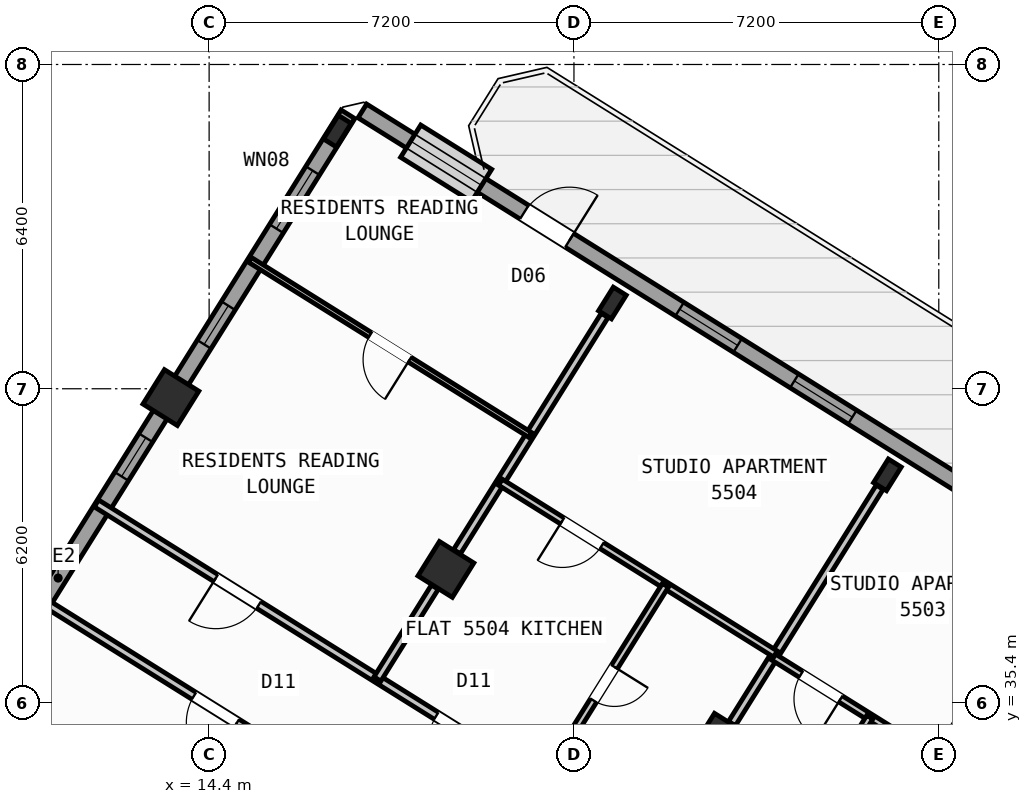
"""IFC4 building model, lengths in metres.
Left out: names, types, materials, properties, quantities, classifications, styles, units other than length and angle.
Written with IfcOpenShell. Run it as: python <this file> out.ifc"""

import sys

from ifc_helpers import new_model, si_unit, direction, frame, frame_2d, origin, origin_2d, place, context, subcontext, project, spatial, rectangle, hollow_rectangle, i_section, extrude, source, transform, mapped, element, fill, save


model = new_model("IFC4")
c1 = context("Model", 3, precision=1e-05, world=origin(), true_north=direction((0.0, 1.0)))
c2 = subcontext(c1, "Body", "Model", "MODEL_VIEW")
j1 = project(units=[si_unit("LENGTHUNIT", "METRE"), si_unit("PLANEANGLEUNIT", "RADIAN")], contexts=[c1])
p1 = place(None, origin())
s1 = spatial("IfcSite", under=j1, at=p1, CompositionType="ELEMENT")
p2 = place(p1, origin())
s2 = spatial("IfcBuilding", under=s1, at=p2, CompositionType="ELEMENT")
p3 = place(p2, frame((0.0, 0.0, 218.4)))
s3 = spatial("IfcBuildingStorey", under=s2, at=p3, CompositionType="ELEMENT", Elevation=218.4)
m1 = source(origin(), c2, "Body", "SweptSolid", [
    extrude(i_section(OverallWidth=0.3, OverallDepth=0.55, WebThickness=0.015, FlangeThickness=0.029, at=origin_2d()), origin(), (0.0, 0.0, 1.0), 3.6),
])
p4 = place(p3, frame((27.786, 39.901, 0.0), z_axis=(0.0, 0.0, 1.0), x_axis=(-0.848048096156, 0.529919264233, 0.0)))
e1 = element("IfcColumn", 1, at=p4, inside=s3, PredefinedType="COLUMN", context=c2, shape_type="MappedRepresentation", body=[
    mapped(m1, transform((0.0, 0.0, 0.0), scale=1.0)),
])
m2 = source(origin(), c2, "Body", "SweptSolid", [
    extrude(hollow_rectangle(XDim=0.8, YDim=0.8, WallThickness=0.032, at=origin_2d()), origin(), (0.0, 0.0, 1.0), 3.6),
])
p5 = place(p3, frame((24.5, 34.643, 0.0), z_axis=(0.0, 0.0, 1.0), x_axis=(-0.848048096156, 0.529919264233, 0.0)))
e2 = element("IfcColumn", 2, at=p5, inside=s3, PredefinedType="COLUMN", context=c2, shape_type="MappedRepresentation", body=[
    mapped(m2, transform((0.0, 0.0, 0.0), scale=1.0)),
])
p6 = place(p3, frame((22.358, 43.292, 0.0), z_axis=(0.0, 0.0, 1.0), x_axis=(-0.848048096156, 0.529919264233, 0.0)))
e3 = element("IfcColumn", 3, at=p6, inside=s3, PredefinedType="COLUMN", context=c2, shape_type="MappedRepresentation", body=[
    mapped(m1, transform((0.0, 0.0, 0.0), scale=1.0)),
])
p7 = place(p3, frame((19.073, 38.034, 0.0), z_axis=(0.0, 0.0, 1.0), x_axis=(-0.848048096156, 0.529919264233, 0.0)))
e4 = element("IfcColumn", 4, at=p7, inside=s3, PredefinedType="COLUMN", context=c2, shape_type="MappedRepresentation", body=[
    mapped(m2, transform((0.0, 0.0, 0.0), scale=1.0)),
])
p8 = place(p3, frame((16.931, 46.684, 0.0), z_axis=(0.0, 0.0, 1.0), x_axis=(-0.848048096156, 0.529919264233, 0.0)))
e5 = element("IfcColumn", 5, at=p8, inside=s3, PredefinedType="COLUMN", context=c2, shape_type="MappedRepresentation", body=[
    mapped(m1, transform((0.0, 0.0, 0.0), scale=1.0)),
])
p9 = place(p3, frame((13.646, 41.426, 0.0), z_axis=(0.0, 0.0, 1.0), x_axis=(-0.848048096156, 0.529919264233, 0.0)))
e6 = element("IfcColumn", 6, at=p9, inside=s3, PredefinedType="COLUMN", context=c2, shape_type="MappedRepresentation", body=[
    mapped(m2, transform((0.0, 0.0, 0.0), scale=1.0)),
])
p10 = place(p3, frame((5.7, 28.71, 0.0), z_axis=(0.0, 0.0, 1.0), x_axis=(0.529923711467, 0.8480453172, 0.0)))
e7 = element("IfcWall", 7, at=p10, inside=s3, PredefinedType="STANDARD", context=c2, shape_type="SweptSolid", body=[
    extrude(rectangle(XDim=21.587, YDim=0.32, at=frame_2d((10.794, 0.0))), origin(), (0.0, 0.0, 1.0), 2.825),
])
p11 = place(p10, frame((2.319, 0.0, 0.9)))
e8 = element("IfcOpeningElement", 8, at=p11, cuts=e7, PredefinedType="OPENING", context=c2, shape_type="SweptSolid", body=[
    extrude(rectangle(XDim=1.65, YDim=1.45, at=frame_2d((0.825, 0.725))), frame((0.0, 0.17, 0.0), z_axis=(0.0, -1.0, 0.0), x_axis=(1.0, 0.0, 0.0)), (0.0, 0.0, 1.0), 0.34),
])
p12 = place(p10, frame((8.629, 0.0, 1.0)))
e9 = element("IfcOpeningElement", 9, at=p12, cuts=e7, PredefinedType="OPENING", context=c2, shape_type="SweptSolid", body=[
    extrude(rectangle(XDim=0.9, YDim=1.25, at=frame_2d((0.45, 0.625))), frame((0.0, 0.17, 0.0), z_axis=(0.0, -1.0, 0.0), x_axis=(1.0, 0.0, 0.0)), (0.0, 0.0, 1.0), 0.34),
])
p13 = place(p10, frame((13.159, 0.0, 1.0)))
e10 = element("IfcOpeningElement", 10, at=p13, cuts=e7, PredefinedType="OPENING", context=c2, shape_type="SweptSolid", body=[
    extrude(rectangle(XDim=0.9, YDim=1.25, at=frame_2d((0.45, 0.625))), frame((0.0, 0.17, 0.0), z_axis=(0.0, -1.0, 0.0), x_axis=(1.0, 0.0, 0.0)), (0.0, 0.0, 1.0), 0.34),
])
p14 = place(p10, frame((16.232, 0.0, 1.0)))
e11 = element("IfcOpeningElement", 11, at=p14, cuts=e7, PredefinedType="OPENING", context=c2, shape_type="SweptSolid", body=[
    extrude(rectangle(XDim=0.9, YDim=1.25, at=frame_2d((0.45, 0.625))), frame((0.0, 0.17, 0.0), z_axis=(0.0, -1.0, 0.0), x_axis=(1.0, 0.0, 0.0)), (0.0, 0.0, 1.0), 0.34),
])
p15 = place(p10, frame((18.925, 0.0, 0.9)))
e12 = element("IfcOpeningElement", 12, at=p15, cuts=e7, PredefinedType="OPENING", context=c2, shape_type="SweptSolid", body=[
    extrude(rectangle(XDim=1.35, YDim=1.45, at=frame_2d((0.675, 0.725))), frame((0.0, 0.17, 0.0), z_axis=(0.0, -1.0, 0.0), x_axis=(1.0, 0.0, 0.0)), (0.0, 0.0, 1.0), 0.34),
])
p16 = place(p3, frame((17.424, 47.083, 0.0), z_axis=(0.0, 0.0, 1.0), x_axis=(0.848049927979, -0.529916332693, 0.0)))
e13 = element("IfcWall", 13, at=p16, inside=s3, PredefinedType="STANDARD", context=c2, shape_type="SweptSolid", body=[
    extrude(rectangle(XDim=29.223, YDim=0.32, at=frame_2d((14.612, 0.0))), origin(), (0.0, 0.0, 1.0), 3.35),
])
p17 = place(p16, frame((3.77, 0.0, 0.0)))
e14 = element("IfcOpeningElement", 14, at=p17, cuts=e13, PredefinedType="OPENING", context=c2, shape_type="SweptSolid", body=[
    extrude(rectangle(XDim=1.05, YDim=2.15, at=frame_2d((0.525, 1.075))), frame((0.0, 0.17, 0.0), z_axis=(0.0, -1.0, 0.0), x_axis=(1.0, 0.0, 0.0)), (0.0, 0.0, 1.0), 0.34),
])
p18 = place(p16, frame((1.125, 0.0, 0.9)))
e15 = element("IfcOpeningElement", 15, at=p18, cuts=e13, PredefinedType="OPENING", context=c2, shape_type="SweptSolid", body=[
    extrude(rectangle(XDim=1.65, YDim=1.45, at=frame_2d((0.825, 0.725))), frame((0.0, 0.17, 0.0), z_axis=(0.0, -1.0, 0.0), x_axis=(1.0, 0.0, 0.0)), (0.0, 0.0, 1.0), 0.34),
])
p19 = place(p16, frame((7.384, 0.0, 0.9)))
e16 = element("IfcOpeningElement", 16, at=p19, cuts=e13, PredefinedType="OPENING", context=c2, shape_type="SweptSolid", body=[
    extrude(rectangle(XDim=1.35, YDim=1.45, at=frame_2d((0.675, 0.725))), frame((0.0, 0.17, 0.0), z_axis=(0.0, -1.0, 0.0), x_axis=(1.0, 0.0, 0.0)), (0.0, 0.0, 1.0), 0.34),
])
p20 = place(p16, frame((10.054, 0.0, 0.9)))
e17 = element("IfcOpeningElement", 17, at=p20, cuts=e13, PredefinedType="OPENING", context=c2, shape_type="SweptSolid", body=[
    extrude(rectangle(XDim=1.35, YDim=1.45, at=frame_2d((0.675, 0.725))), frame((0.0, 0.17, 0.0), z_axis=(0.0, -1.0, 0.0), x_axis=(1.0, 0.0, 0.0)), (0.0, 0.0, 1.0), 0.34),
])
p21 = place(p16, frame((14.039, 0.0, 1.0)))
e18 = element("IfcOpeningElement", 18, at=p21, cuts=e13, PredefinedType="OPENING", context=c2, shape_type="SweptSolid", body=[
    extrude(rectangle(XDim=0.9, YDim=1.25, at=frame_2d((0.45, 0.625))), frame((0.0, 0.17, 0.0), z_axis=(0.0, -1.0, 0.0), x_axis=(1.0, 0.0, 0.0)), (0.0, 0.0, 1.0), 0.34),
])
p22 = place(p16, frame((17.254, 0.0, 1.0)))
e19 = element("IfcOpeningElement", 19, at=p22, cuts=e13, PredefinedType="OPENING", context=c2, shape_type="SweptSolid", body=[
    extrude(rectangle(XDim=0.9, YDim=1.25, at=frame_2d((0.45, 0.625))), frame((0.0, 0.17, 0.0), z_axis=(0.0, -1.0, 0.0), x_axis=(1.0, 0.0, 0.0)), (0.0, 0.0, 1.0), 0.34),
])
p23 = place(p16, frame((20.161, 0.0, 0.9)))
e20 = element("IfcOpeningElement", 20, at=p23, cuts=e13, PredefinedType="OPENING", context=c2, shape_type="SweptSolid", body=[
    extrude(rectangle(XDim=1.35, YDim=1.45, at=frame_2d((0.675, 0.725))), frame((0.0, 0.17, 0.0), z_axis=(0.0, -1.0, 0.0), x_axis=(1.0, 0.0, 0.0)), (0.0, 0.0, 1.0), 0.34),
])
p24 = place(p16, frame((22.846, 0.0, 0.9)))
e21 = element("IfcOpeningElement", 21, at=p24, cuts=e13, PredefinedType="OPENING", context=c2, shape_type="SweptSolid", body=[
    extrude(rectangle(XDim=1.35, YDim=1.45, at=frame_2d((0.675, 0.725))), frame((0.0, 0.17, 0.0), z_axis=(0.0, -1.0, 0.0), x_axis=(1.0, 0.0, 0.0)), (0.0, 0.0, 1.0), 0.34),
])
p25 = place(p16, frame((26.898, 0.0, 1.0)))
e22 = element("IfcOpeningElement", 22, at=p25, cuts=e13, PredefinedType="OPENING", context=c2, shape_type="SweptSolid", body=[
    extrude(rectangle(XDim=0.9, YDim=1.25, at=frame_2d((0.45, 0.625))), frame((0.0, 0.17, 0.0), z_axis=(0.0, -1.0, 0.0), x_axis=(1.0, 0.0, 0.0)), (0.0, 0.0, 1.0), 0.34),
])
p26 = place(p3, frame((31.239, 38.274, 0.0), z_axis=(0.0, 0.0, 1.0), x_axis=(-0.529920220799, -0.848047498427, 0.0)))
e23 = element("IfcWall", 23, at=p26, inside=s3, PredefinedType="PARTITIONING", context=c2, shape_type="SweptSolid", body=[
    extrude(rectangle(XDim=9.2, YDim=0.16, at=frame_2d((4.6, 0.0))), origin(), (0.0, 0.0, 1.0), 3.34),
])
p27 = place(p3, frame((26.363, 30.472, 0.0), z_axis=(0.0, 0.0, 1.0), x_axis=(-0.848052408131, 0.529912363569, 0.0)))
e24 = element("IfcWall", 24, at=p27, inside=s3, PredefinedType="PARTITIONING", context=c2, shape_type="SweptSolid", body=[
    extrude(rectangle(XDim=16.73, YDim=0.16, at=frame_2d((8.365, 0.0))), origin(), (0.0, 0.0, 1.0), 3.34),
])
p28 = place(p27, frame((2.22, 0.0, 0.0)))
e25 = element("IfcOpeningElement", 25, at=p28, cuts=e24, PredefinedType="OPENING", context=c2, shape_type="SweptSolid", body=[
    extrude(rectangle(XDim=0.86, YDim=2.05, at=frame_2d((0.43, 1.025))), frame((0.0, 0.09, 0.0), z_axis=(0.0, -1.0, 0.0), x_axis=(1.0, 0.0, 0.0)), (0.0, 0.0, 1.0), 0.18),
])
p29 = place(p27, frame((7.82, 0.0, 0.0)))
e26 = element("IfcOpeningElement", 26, at=p29, cuts=e24, PredefinedType="OPENING", context=c2, shape_type="SweptSolid", body=[
    extrude(rectangle(XDim=1.0, YDim=2.1, at=frame_2d((0.5, 1.05))), frame((0.0, 0.09, 0.0), z_axis=(0.0, -1.0, 0.0), x_axis=(1.0, 0.0, 0.0)), (0.0, 0.0, 1.0), 0.18),
])
p30 = place(p27, frame((12.95, 0.0, 0.0)))
e27 = element("IfcOpeningElement", 27, at=p30, cuts=e24, PredefinedType="OPENING", context=c2, shape_type="SweptSolid", body=[
    extrude(rectangle(XDim=1.0, YDim=2.1, at=frame_2d((0.5, 1.05))), frame((0.0, 0.09, 0.0), z_axis=(0.0, -1.0, 0.0), x_axis=(1.0, 0.0, 0.0)), (0.0, 0.0, 1.0), 0.18),
])
p31 = place(p3, frame((25.198, 28.606, 0.0), z_axis=(0.0, 0.0, 1.0), x_axis=(-0.848052408131, 0.529912363569, 0.0)))
e28 = element("IfcWall", 28, at=p31, inside=s3, PredefinedType="PARTITIONING", context=c2, shape_type="SweptSolid", body=[
    extrude(rectangle(XDim=16.73, YDim=0.16, at=frame_2d((8.365, 0.0))), origin(), (0.0, 0.0, 1.0), 3.34),
])
p32 = place(p31, frame((2.22, 0.0, 0.0)))
e29 = element("IfcOpeningElement", 29, at=p32, cuts=e28, PredefinedType="OPENING", context=c2, shape_type="SweptSolid", body=[
    extrude(rectangle(XDim=0.86, YDim=2.05, at=frame_2d((0.43, 1.025))), frame((0.0, 0.09, 0.0), z_axis=(0.0, -1.0, 0.0), x_axis=(1.0, 0.0, 0.0)), (0.0, 0.0, 1.0), 0.18),
])
p33 = place(p31, frame((12.084, 0.0, 0.0)))
e30 = element("IfcOpeningElement", 30, at=p33, cuts=e28, PredefinedType="OPENING", context=c2, shape_type="SweptSolid", body=[
    extrude(rectangle(XDim=1.0, YDim=2.1, at=frame_2d((0.5, 1.05))), frame((0.0, 0.09, 0.0), z_axis=(0.0, -1.0, 0.0), x_axis=(1.0, 0.0, 0.0)), (0.0, 0.0, 1.0), 0.18),
])
p34 = place(p3, frame((27.634, 39.657, 0.0), z_axis=(0.0, 0.0, 1.0), x_axis=(-0.529899205623, -0.848060629837, 0.0)))
e31 = element("IfcWall", 31, at=p34, inside=s3, PredefinedType="PARTITIONING", context=c2, shape_type="SweptSolid", body=[
    extrude(rectangle(XDim=5.501, YDim=0.16, at=frame_2d((2.75, 0.0))), origin(), (0.0, 0.0, 1.0), 2.825),
])
p35 = place(p3, frame((28.753, 34.297, 0.0), z_axis=(0.0, 0.0, 1.0), x_axis=(-0.848059820872, 0.529900500304, 0.0)))
e32 = element("IfcWall", 32, at=p35, inside=s3, PredefinedType="PLUMBINGWALL", context=c2, shape_type="SweptSolid", body=[
    extrude(rectangle(XDim=3.79, YDim=0.14, at=frame_2d((1.895, 0.0))), origin(), (0.0, 0.0, 1.0), 3.34),
])
p36 = place(p35, frame((2.23, 0.0, 0.0)))
e33 = element("IfcOpeningElement", 33, at=p36, cuts=e32, PredefinedType="OPENING", context=c2, shape_type="SweptSolid", body=[
    extrude(rectangle(XDim=0.92, YDim=2.08, at=frame_2d((0.46, 1.04))), frame((0.0, 0.08, 0.0), z_axis=(0.0, -1.0, 0.0), x_axis=(1.0, 0.0, 0.0)), (0.0, 0.0, 1.0), 0.16),
])
p37 = place(p3, frame((27.439, 35.118, 0.0), z_axis=(0.0, 0.0, 1.0), x_axis=(-0.529911350634, -0.84805304107, 0.0)))
e34 = element("IfcWall", 34, at=p37, inside=s3, PredefinedType="PLUMBINGWALL", context=c2, shape_type="SweptSolid", body=[
    extrude(rectangle(XDim=4.51, YDim=0.14, at=frame_2d((2.255, 0.0))), origin(), (0.0, 0.0, 1.0), 2.995),
])
p38 = place(p37, frame((1.865, 0.0, 0.0)))
e35 = element("IfcOpeningElement", 35, at=p38, cuts=e34, PredefinedType="OPENING", context=c2, shape_type="SweptSolid", body=[
    extrude(rectangle(XDim=0.78, YDim=2.05, at=frame_2d((0.39, 1.025))), frame((0.0, 0.08, 0.0), z_axis=(0.0, -1.0, 0.0), x_axis=(1.0, 0.0, 0.0)), (0.0, 0.0, 1.0), 0.16),
])
p39 = place(p3, frame((22.206, 43.049, 0.0), z_axis=(0.0, 0.0, 1.0), x_axis=(-0.529919150083, -0.848048167486, 0.0)))
e36 = element("IfcWall", 36, at=p39, inside=s3, PredefinedType="PARTITIONING", context=c2, shape_type="SweptSolid", body=[
    extrude(rectangle(XDim=5.501, YDim=0.16, at=frame_2d((2.75, 0.0))), origin(), (0.0, 0.0, 1.0), 2.825),
])
p40 = place(p3, frame((18.854, 37.685, 0.0), z_axis=(0.0, 0.0, 1.0), x_axis=(-0.52989628283, -0.848062456098, 0.0)))
e37 = element("IfcWall", 37, at=p40, inside=s3, PredefinedType="PARTITIONING", context=c2, shape_type="SweptSolid", body=[
    extrude(rectangle(XDim=2.138, YDim=0.16, at=frame_2d((1.069, 0.0))), origin(), (0.0, 0.0, 1.0), 2.825),
])
p41 = place(p3, frame((25.576, 36.365, 0.0), z_axis=(0.0, 0.0, 1.0), x_axis=(-0.848056163074, 0.529906354247, 0.0)))
e38 = element("IfcWall", 38, at=p41, inside=s3, PredefinedType="PLUMBINGWALL", context=c2, shape_type="SweptSolid", body=[
    extrude(rectangle(XDim=6.4, YDim=0.14, at=frame_2d((3.2, 0.0))), origin(), (0.0, 0.0, 1.0), 3.34),
])
p42 = place(p41, frame((4.04, 0.0, 0.0)))
e39 = element("IfcOpeningElement", 39, at=p42, cuts=e38, PredefinedType="OPENING", context=c2, shape_type="SweptSolid", body=[
    extrude(rectangle(XDim=0.92, YDim=2.08, at=frame_2d((0.46, 1.04))), frame((0.0, 0.08, 0.0), z_axis=(0.0, -1.0, 0.0), x_axis=(1.0, 0.0, 0.0)), (0.0, 0.0, 1.0), 0.16),
])
p43 = place(p3, frame((23.405, 37.721, 0.0), z_axis=(0.0, 0.0, 1.0), x_axis=(-0.529955816375, -0.848025254748, 0.0)))
e40 = element("IfcWall", 40, at=p43, inside=s3, PredefinedType="PLUMBINGWALL", context=c2, shape_type="SweptSolid", body=[
    extrude(rectangle(XDim=4.58, YDim=0.14, at=frame_2d((2.29, 0.0))), origin(), (0.0, 0.0, 1.0), 3.34),
])
p44 = place(p43, frame((1.9, 0.0, 0.0)))
e41 = element("IfcOpeningElement", 41, at=p44, cuts=e40, PredefinedType="OPENING", context=c2, shape_type="SweptSolid", body=[
    extrude(rectangle(XDim=0.78, YDim=2.05, at=frame_2d((0.39, 1.025))), frame((0.0, 0.08, 0.0), z_axis=(0.0, -1.0, 0.0), x_axis=(1.0, 0.0, 0.0)), (0.0, 0.0, 1.0), 0.16),
])
p45 = place(p3, frame((20.733, 40.69, 0.0), z_axis=(0.0, 0.0, 1.0), x_axis=(-0.848048787466, 0.529918157905, 0.0)))
e42 = element("IfcWall", 42, at=p45, inside=s3, PredefinedType="PARTITIONING", context=c2, shape_type="SweptSolid", body=[
    extrude(rectangle(XDim=6.52, YDim=0.11, at=frame_2d((3.26, 0.0))), origin(), (0.0, 0.0, 1.0), 3.34),
])
p46 = place(p45, frame((2.8, 0.0, 0.0)))
e43 = element("IfcOpeningElement", 43, at=p46, cuts=e42, PredefinedType="OPENING", context=c2, shape_type="SweptSolid", body=[
    extrude(rectangle(XDim=0.92, YDim=2.08, at=frame_2d((0.46, 1.04))), frame((0.0, 0.065, 0.0), z_axis=(0.0, -1.0, 0.0), x_axis=(1.0, 0.0, 0.0)), (0.0, 0.0, 1.0), 0.13),
])
m3 = source(origin(), c2, "Body", "SweptSolid", [
    extrude(rectangle(XDim=1.05, YDim=2.15, at=frame_2d((0.525, 1.075))), frame((0.0, 0.025, 0.0), z_axis=(0.0, -1.0, 0.0), x_axis=(1.0, 0.0, 0.0)), (0.0, 0.0, 1.0), 0.05),
])
p47 = place(p17, origin())
e44 = element("IfcDoor", 44, at=p47, inside=s3, OperationType="SINGLE_SWING_RIGHT", PredefinedType="DOOR", context=c2, shape_type="MappedRepresentation", body=[
    mapped(m3, transform((0.0, 0.0, 0.0), scale=1.0)),
])
fill(e14, e44)
m4 = source(origin(), c2, "Body", "SweptSolid", [
    extrude(rectangle(XDim=0.9, YDim=1.25, at=frame_2d((0.45, 0.625))), frame((0.0, 0.03, 0.0), z_axis=(0.0, -1.0, 0.0), x_axis=(1.0, 0.0, 0.0)), (0.0, 0.0, 1.0), 0.06),
])
p48 = place(p13, origin())
e45 = element("IfcWindow", 45, at=p48, inside=s3, PartitioningType="SINGLE_PANEL", PredefinedType="WINDOW", context=c2, shape_type="MappedRepresentation", body=[
    mapped(m4, transform((0.0, 0.0, 0.0), scale=1.0)),
])
fill(e10, e45)
p49 = place(p14, origin())
e46 = element("IfcWindow", 46, at=p49, inside=s3, PartitioningType="SINGLE_PANEL", PredefinedType="WINDOW", context=c2, shape_type="MappedRepresentation", body=[
    mapped(m4, transform((0.0, 0.0, 0.0), scale=1.0)),
])
fill(e11, e46)
m5 = source(origin(), c2, "Body", "SweptSolid", [
    extrude(rectangle(XDim=1.35, YDim=1.45, at=frame_2d((0.675, 0.725))), frame((0.0, 0.03, 0.0), z_axis=(0.0, -1.0, 0.0), x_axis=(1.0, 0.0, 0.0)), (0.0, 0.0, 1.0), 0.06),
])
p50 = place(p15, origin())
e47 = element("IfcWindow", 47, at=p50, inside=s3, PartitioningType="SINGLE_PANEL", PredefinedType="WINDOW", context=c2, shape_type="MappedRepresentation", body=[
    mapped(m5, transform((0.0, 0.0, 0.0), scale=1.0)),
])
fill(e12, e47)
m6 = source(origin(), c2, "Body", "SweptSolid", [
    extrude(rectangle(XDim=1.65, YDim=1.45, at=frame_2d((0.825, 0.725))), frame((0.0, 0.03, 0.0), z_axis=(0.0, -1.0, 0.0), x_axis=(1.0, 0.0, 0.0)), (0.0, 0.0, 1.0), 0.06),
])
p51 = place(p18, origin())
e48 = element("IfcWindow", 48, at=p51, inside=s3, PartitioningType="SINGLE_PANEL", PredefinedType="WINDOW", context=c2, shape_type="MappedRepresentation", body=[
    mapped(m6, transform((0.0, 0.0, 0.0), scale=1.0)),
])
fill(e15, e48)
p52 = place(p19, origin())
e49 = element("IfcWindow", 49, at=p52, inside=s3, PartitioningType="SINGLE_PANEL", PredefinedType="WINDOW", context=c2, shape_type="MappedRepresentation", body=[
    mapped(m5, transform((0.0, 0.0, 0.0), scale=1.0)),
])
fill(e16, e49)
p53 = place(p20, origin())
e50 = element("IfcWindow", 50, at=p53, inside=s3, PartitioningType="SINGLE_PANEL", PredefinedType="WINDOW", context=c2, shape_type="MappedRepresentation", body=[
    mapped(m5, transform((0.0, 0.0, 0.0), scale=1.0)),
])
fill(e17, e50)
m7 = source(origin(), c2, "Body", "SweptSolid", [
    extrude(rectangle(XDim=1.0, YDim=2.1, at=frame_2d((0.5, 1.05))), frame((0.0, 0.025, 0.0), z_axis=(0.0, -1.0, 0.0), x_axis=(1.0, 0.0, 0.0)), (0.0, 0.0, 1.0), 0.05),
])
p54 = place(p33, origin())
e51 = element("IfcDoor", 51, at=p54, inside=s3, OperationType="SINGLE_SWING_LEFT", PredefinedType="DOOR", context=c2, shape_type="MappedRepresentation", body=[
    mapped(m7, transform((0.0, 0.0, 0.0), scale=1.0)),
])
fill(e30, e51)
m8 = source(origin(), c2, "Body", "SweptSolid", [
    extrude(rectangle(XDim=0.92, YDim=2.08, at=frame_2d((0.46, 1.04))), frame((0.0, 0.025, 0.0), z_axis=(0.0, -1.0, 0.0), x_axis=(1.0, 0.0, 0.0)), (0.0, 0.0, 1.0), 0.05),
])
p55 = place(p36, origin())
e52 = element("IfcDoor", 52, at=p55, inside=s3, OperationType="SINGLE_SWING_LEFT", PredefinedType="DOOR", context=c2, shape_type="MappedRepresentation", body=[
    mapped(m8, transform((0.0, 0.0, 0.0), scale=1.0)),
])
fill(e33, e52)
p56 = place(p29, origin())
e53 = element("IfcDoor", 53, at=p56, inside=s3, OperationType="SINGLE_SWING_LEFT", PredefinedType="DOOR", context=c2, shape_type="MappedRepresentation", body=[
    mapped(m7, transform((0.0, 0.0, 0.0), scale=1.0)),
])
fill(e26, e53)
p57 = place(p42, origin())
e54 = element("IfcDoor", 54, at=p57, inside=s3, OperationType="SINGLE_SWING_RIGHT", PredefinedType="DOOR", context=c2, shape_type="MappedRepresentation", body=[
    mapped(m8, transform((0.0, 0.0, 0.0), scale=1.0)),
])
fill(e39, e54)
m9 = source(origin(), c2, "Body", "SweptSolid", [
    extrude(rectangle(XDim=0.78, YDim=2.05, at=frame_2d((0.39, 1.025))), frame((0.0, 0.025, 0.0), z_axis=(0.0, -1.0, 0.0), x_axis=(1.0, 0.0, 0.0)), (0.0, 0.0, 1.0), 0.05),
])
p58 = place(p44, origin())
e55 = element("IfcDoor", 55, at=p58, inside=s3, OperationType="SINGLE_SWING_LEFT", PredefinedType="DOOR", context=c2, shape_type="MappedRepresentation", body=[
    mapped(m9, transform((0.0, 0.0, 0.0), scale=1.0)),
])
fill(e41, e55)
p59 = place(p30, origin())
e56 = element("IfcDoor", 56, at=p59, inside=s3, OperationType="SINGLE_SWING_RIGHT", PredefinedType="DOOR", context=c2, shape_type="MappedRepresentation", body=[
    mapped(m7, transform((0.0, 0.0, 0.0), scale=1.0)),
])
fill(e27, e56)
p60 = place(p46, origin())
e57 = element("IfcDoor", 57, at=p60, inside=s3, OperationType="SINGLE_SWING_LEFT", PredefinedType="DOOR", context=c2, shape_type="MappedRepresentation", body=[
    mapped(m8, transform((0.0, 0.0, 0.0), scale=1.0)),
])
fill(e43, e57)
save(model, sys.argv[1])
